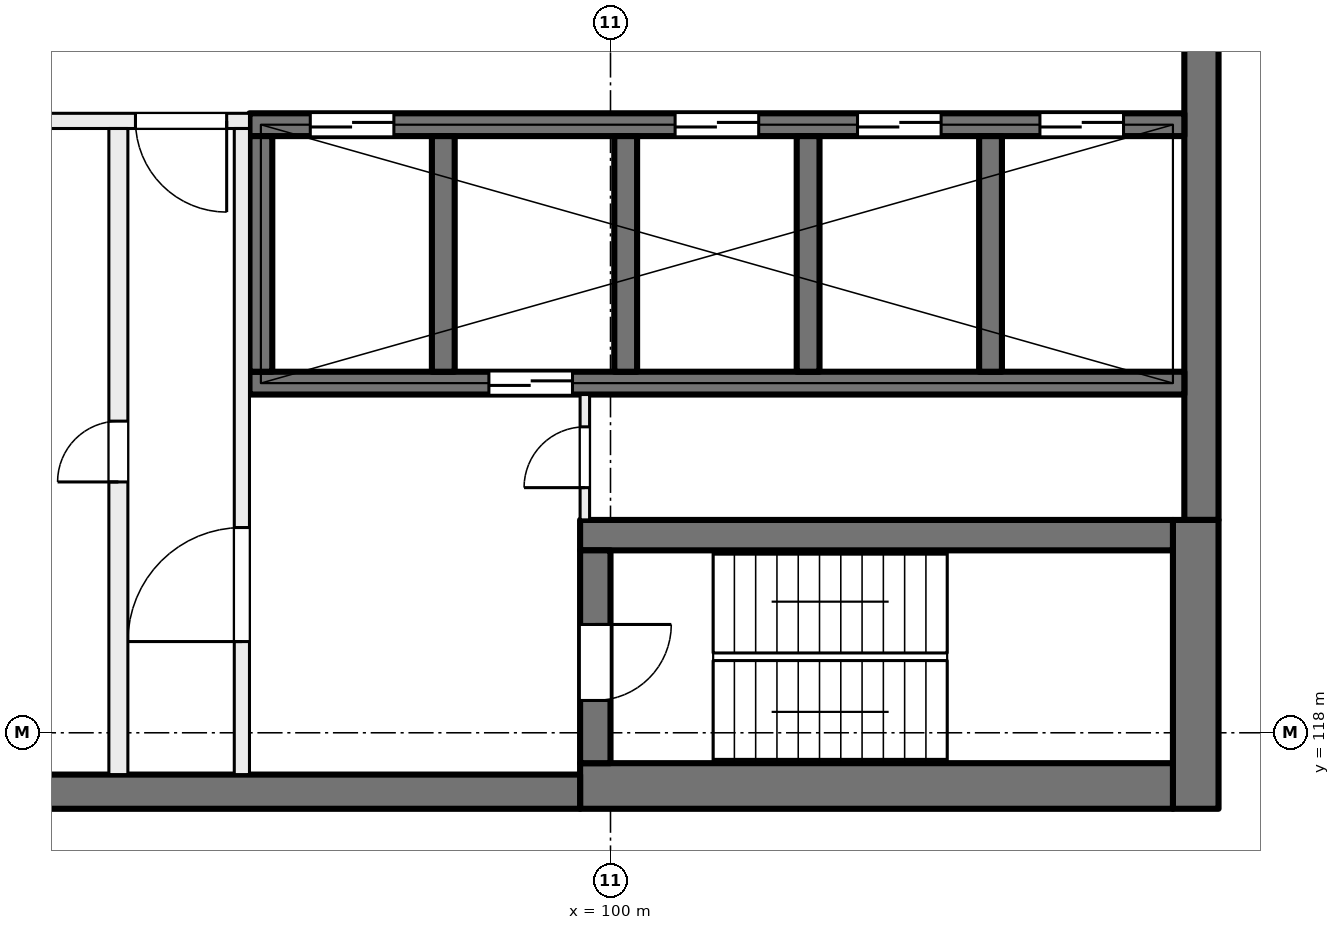
"""IFC4 building model, lengths in metres.
Left out: names, types, materials, properties, quantities, classifications, styles, units other than length and angle.
Written with IfcOpenShell. Run it as: python <this file> out.ifc"""

import sys

from ifc_helpers import new_model, si_unit, direction, frame, frame_2d, origin, place, context, subcontext, project, spatial, rectangle, extrude, element, fill, save


model = new_model("IFC4")
c1 = context("Model", 3, precision=1e-05, world=origin(), true_north=direction((0.0, 1.0)))
c2 = subcontext(c1, "Body", "Model", "MODEL_VIEW")
j1 = project(units=[si_unit("LENGTHUNIT", "METRE"), si_unit("PLANEANGLEUNIT", "RADIAN")], contexts=[c1])
p1 = place(None, origin())
s1 = spatial("IfcSite", under=j1, at=p1, CompositionType="ELEMENT")
p2 = place(p1, origin())
s2 = spatial("IfcBuilding", under=s1, at=p2, CompositionType="ELEMENT")
p3 = place(p2, frame((0.0, 0.0, 253.5)))
s3 = spatial("IfcBuildingStorey", under=s2, at=p3, CompositionType="ELEMENT", Elevation=253.5)
p4 = place(p3, frame((107.775, 135.2, 0.0), z_axis=(0.0, 0.0, 1.0), x_axis=(0.0, -1.0, 0.0)))
e1 = element("IfcWall", 1, at=p4, inside=s3, PredefinedType="SHEAR", context=c2, shape_type="SweptSolid", body=[
    extrude(rectangle(XDim=14.4, YDim=0.45, at=frame_2d((7.2, 0.0))), origin(), (0.0, 0.0, 1.0), 4.0),
])
p5 = place(p3, frame((107.7, 120.8, 0.0), z_axis=(0.0, 0.0, 1.0), x_axis=(0.0, -1.0, 0.0)))
e2 = element("IfcWall", 2, at=p5, inside=s3, PredefinedType="SHEAR", context=c2, shape_type="SweptSolid", body=[
    extrude(rectangle(XDim=3.8, YDim=0.6, at=frame_2d((1.9, 0.0))), origin(), (0.0, 0.0, 1.0), 4.0),
])
p6 = place(p3, frame((107.4, 117.3, 0.0), z_axis=(0.0, 0.0, 1.0), x_axis=(-1.0, 0.0, 0.0)))
e3 = element("IfcWall", 3, at=p6, inside=s3, PredefinedType="SHEAR", context=c2, shape_type="SweptSolid", body=[
    extrude(rectangle(XDim=7.8, YDim=0.6, at=frame_2d((3.9, 0.0))), origin(), (0.0, 0.0, 1.0), 4.0),
])
p7 = place(p3, frame((99.6, 117.225, 0.0), z_axis=(0.0, 0.0, 1.0), x_axis=(-1.0, 0.0, 0.0)))
e4 = element("IfcWall", 4, at=p7, inside=s3, PredefinedType="SHEAR", context=c2, shape_type="SweptSolid", body=[
    extrude(rectangle(XDim=9.0, YDim=0.45, at=frame_2d((4.5, 0.0))), origin(), (0.0, 0.0, 1.0), 4.0),
])
p8 = place(p3, frame((107.4, 120.6, 0.0), z_axis=(0.0, 0.0, 1.0), x_axis=(-1.0, 0.0, 0.0)))
e5 = element("IfcWall", 5, at=p8, inside=s3, PredefinedType="SHEAR", context=c2, shape_type="SweptSolid", body=[
    extrude(rectangle(XDim=7.8, YDim=0.4, at=frame_2d((3.9, 0.0))), origin(), (0.0, 0.0, 1.0), 4.0),
])
p9 = place(p3, frame((99.8, 120.4, 0.0), z_axis=(0.0, 0.0, 1.0), x_axis=(0.0, -1.0, 0.0)))
e6 = element("IfcWall", 6, at=p9, inside=s3, PredefinedType="SHEAR", context=c2, shape_type="SweptSolid", body=[
    extrude(rectangle(XDim=2.8, YDim=0.4, at=frame_2d((1.4, 0.0))), origin(), (0.0, 0.0, 1.0), 4.0),
])
p10 = place(p9, frame((0.975, 0.0, 0.0)))
e7 = element("IfcOpeningElement", 7, at=p10, cuts=e6, PredefinedType="OPENING", context=c2, shape_type="SweptSolid", body=[
    extrude(rectangle(XDim=1.0, YDim=2.1, at=frame_2d((0.5, 1.05))), frame((0.0, 0.21, 0.0), z_axis=(0.0, -1.0, 0.0), x_axis=(1.0, 0.0, 0.0)), (0.0, 0.0, 1.0), 0.42),
])
p11 = place(p3, frame((107.55, 126.0, 0.0), z_axis=(0.0, 0.0, 1.0), x_axis=(-1.0, 0.0, 0.0)))
e8 = element("IfcWall", 8, at=p11, inside=s3, PredefinedType="SHEAR", context=c2, shape_type="SweptSolid", body=[
    extrude(rectangle(XDim=12.3, YDim=0.3, at=frame_2d((6.15, 0.0))), origin(), (0.0, 0.0, 1.0), 4.0),
])
p12 = place(p11, frame((0.8, 0.0, 0.0)))
e9 = element("IfcOpeningElement", 9, at=p12, cuts=e8, PredefinedType="OPENING", context=c2, shape_type="SweptSolid", body=[
    extrude(rectangle(XDim=1.1, YDim=2.1, at=frame_2d((0.55, 1.05))), frame((0.0, 0.16, 0.0), z_axis=(0.0, -1.0, 0.0), x_axis=(1.0, 0.0, 0.0)), (0.0, 0.0, 1.0), 0.32),
])
p13 = place(p11, frame((3.2, 0.0, 0.0)))
e10 = element("IfcOpeningElement", 10, at=p13, cuts=e8, PredefinedType="OPENING", context=c2, shape_type="SweptSolid", body=[
    extrude(rectangle(XDim=1.1, YDim=2.1, at=frame_2d((0.55, 1.05))), frame((0.0, 0.16, 0.0), z_axis=(0.0, -1.0, 0.0), x_axis=(1.0, 0.0, 0.0)), (0.0, 0.0, 1.0), 0.32),
])
p14 = place(p11, frame((5.6, 0.0, 0.0)))
e11 = element("IfcOpeningElement", 11, at=p14, cuts=e8, PredefinedType="OPENING", context=c2, shape_type="SweptSolid", body=[
    extrude(rectangle(XDim=1.1, YDim=2.1, at=frame_2d((0.55, 1.05))), frame((0.0, 0.16, 0.0), z_axis=(0.0, -1.0, 0.0), x_axis=(1.0, 0.0, 0.0)), (0.0, 0.0, 1.0), 0.32),
])
p15 = place(p11, frame((10.4, 0.0, 0.0)))
e12 = element("IfcOpeningElement", 12, at=p15, cuts=e8, PredefinedType="OPENING", context=c2, shape_type="SweptSolid", body=[
    extrude(rectangle(XDim=1.1, YDim=2.1, at=frame_2d((0.55, 1.05))), frame((0.0, 0.16, 0.0), z_axis=(0.0, -1.0, 0.0), x_axis=(1.0, 0.0, 0.0)), (0.0, 0.0, 1.0), 0.32),
])
p16 = place(p3, frame((107.55, 122.6, 0.0), z_axis=(0.0, 0.0, 1.0), x_axis=(-1.0, 0.0, 0.0)))
e13 = element("IfcWall", 13, at=p16, inside=s3, PredefinedType="SHEAR", context=c2, shape_type="SweptSolid", body=[
    extrude(rectangle(XDim=12.3, YDim=0.3, at=frame_2d((6.15, 0.0))), origin(), (0.0, 0.0, 1.0), 4.0),
])
p17 = place(p16, frame((8.05, 0.0, 0.0)))
e14 = element("IfcOpeningElement", 14, at=p17, cuts=e13, PredefinedType="OPENING", context=c2, shape_type="SweptSolid", body=[
    extrude(rectangle(XDim=1.1, YDim=2.1, at=frame_2d((0.55, 1.05))), frame((0.0, 0.16, 0.0), z_axis=(0.0, -1.0, 0.0), x_axis=(1.0, 0.0, 0.0)), (0.0, 0.0, 1.0), 0.32),
])
for number, where, z_axis, x_axis in (
    (15, (105.0, 125.85, 0.0), (0.0, 0.0, 1.0), (0.0, -1.0, 0.0)),
    (16, (102.6, 125.85, 0.0), (0.0, 0.0, 1.0), (0.0, -1.0, 0.0)),
    (17, (100.2, 125.85, 0.0), (0.0, 0.0, 1.0), (0.0, -1.0, 0.0)),
    (18, (97.8, 125.85, 0.0), (0.0, 0.0, 1.0), (0.0, -1.0, 0.0)),
    (19, (95.4, 125.85, 0.0), (0.0, 0.0, 1.0), (0.0, -1.0, 0.0)),
):
    element("IfcWall", number, at=place(p3, frame(where, z_axis=z_axis, x_axis=x_axis)), inside=s3, PredefinedType="SHEAR", context=c2, shape_type="SweptSolid", body=[
        extrude(rectangle(XDim=3.1, YDim=0.3, at=frame_2d((1.55, 0.0))), origin(), (0.0, 0.0, 1.0), 4.0),
    ])
p18 = place(p3, frame((95.25, 126.05, 0.0), z_axis=(0.0, 0.0, 1.0), x_axis=(-1.0, 0.0, 0.0)))
e20 = element("IfcWall", 20, at=p18, inside=s3, PredefinedType="PARTITIONING", context=c2, shape_type="SweptSolid", body=[
    extrude(rectangle(XDim=3.95, YDim=0.2, at=frame_2d((1.975, 0.0))), origin(), (0.0, 0.0, 1.0), 3.625),
])
p19 = place(p18, frame((0.3, 0.0, 0.0)))
e21 = element("IfcOpeningElement", 21, at=p19, cuts=e20, PredefinedType="OPENING", context=c2, shape_type="SweptSolid", body=[
    extrude(rectangle(XDim=1.2, YDim=2.1, at=frame_2d((0.6, 1.05))), frame((0.0, 0.11, 0.0), z_axis=(0.0, -1.0, 0.0), x_axis=(1.0, 0.0, 0.0)), (0.0, 0.0, 1.0), 0.22),
])
p20 = place(p3, frame((95.15, 117.45, 0.0), z_axis=(0.0, 0.0, 1.0), x_axis=(0.0, 1.0, 0.0)))
e22 = element("IfcWall", 22, at=p20, inside=s3, PredefinedType="PARTITIONING", context=c2, shape_type="SweptSolid", body=[
    extrude(rectangle(XDim=8.5, YDim=0.2, at=frame_2d((4.25, 0.0))), origin(), (0.0, 0.0, 1.0), 3.625),
])
p21 = place(p20, frame((1.75, 0.0, 0.0)))
e23 = element("IfcOpeningElement", 23, at=p21, cuts=e22, PredefinedType="OPENING", context=c2, shape_type="SweptSolid", body=[
    extrude(rectangle(XDim=1.5, YDim=2.1, at=frame_2d((0.75, 1.05))), frame((0.0, 0.11, 0.0), z_axis=(0.0, -1.0, 0.0), x_axis=(1.0, 0.0, 0.0)), (0.0, 0.0, 1.0), 0.22),
])
p22 = place(p3, frame((93.525, 117.45, 0.0), z_axis=(0.0, 0.0, 1.0), x_axis=(0.0, 1.0, 0.0)))
e24 = element("IfcWall", 24, at=p22, inside=s3, PredefinedType="PARTITIONING", context=c2, shape_type="SweptSolid", body=[
    extrude(rectangle(XDim=8.5, YDim=0.25, at=frame_2d((4.25, 0.0))), origin(), (0.0, 0.0, 1.0), 3.625),
])
p23 = place(p22, frame((3.85, 0.0, 0.0)))
e25 = element("IfcOpeningElement", 25, at=p23, cuts=e24, PredefinedType="OPENING", context=c2, shape_type="SweptSolid", body=[
    extrude(rectangle(XDim=0.8, YDim=2.1, at=frame_2d((0.4, 1.05))), frame((0.0, 0.135, 0.0), z_axis=(0.0, -1.0, 0.0), x_axis=(1.0, 0.0, 0.0)), (0.0, 0.0, 1.0), 0.27),
])
p24 = place(p3, frame((99.663, 120.8, 0.0), z_axis=(0.0, 0.0, 1.0), x_axis=(0.0, 1.0, 0.0)))
e26 = element("IfcWall", 26, at=p24, inside=s3, PredefinedType="PARTITIONING", context=c2, shape_type="SweptSolid", body=[
    extrude(rectangle(XDim=1.65, YDim=0.125, at=frame_2d((0.825, 0.0))), origin(), (0.0, 0.0, 1.0), 3.625),
])
p25 = place(p24, frame((0.425, 0.0, 0.0)))
e27 = element("IfcOpeningElement", 27, at=p25, cuts=e26, PredefinedType="OPENING", context=c2, shape_type="SweptSolid", body=[
    extrude(rectangle(XDim=0.8, YDim=2.1, at=frame_2d((0.4, 1.05))), frame((0.0, 0.073, 0.0), z_axis=(0.0, -1.0, 0.0), x_axis=(1.0, 0.0, 0.0)), (0.0, 0.0, 1.0), 0.145),
])
p26 = place(p12, origin())
e28 = element("IfcDoor", 28, at=p26, inside=s3, OperationType="DOUBLE_DOOR_SLIDING", PredefinedType="DOOR", context=c2, shape_type="SweptSolid", body=[
    extrude(rectangle(XDim=1.1, YDim=2.1, at=frame_2d((0.55, 1.05))), frame((0.0, 0.025, 0.0), z_axis=(0.0, -1.0, 0.0), x_axis=(1.0, 0.0, 0.0)), (0.0, 0.0, 1.0), 0.05),
])
fill(e9, e28)
p27 = place(p13, origin())
e29 = element("IfcDoor", 29, at=p27, inside=s3, OperationType="DOUBLE_DOOR_SLIDING", PredefinedType="DOOR", context=c2, shape_type="SweptSolid", body=[
    extrude(rectangle(XDim=1.1, YDim=2.1, at=frame_2d((0.55, 1.05))), frame((0.0, 0.025, 0.0), z_axis=(0.0, -1.0, 0.0), x_axis=(1.0, 0.0, 0.0)), (0.0, 0.0, 1.0), 0.05),
])
fill(e10, e29)
p28 = place(p14, origin())
e30 = element("IfcDoor", 30, at=p28, inside=s3, OperationType="DOUBLE_DOOR_SLIDING", PredefinedType="DOOR", context=c2, shape_type="SweptSolid", body=[
    extrude(rectangle(XDim=1.1, YDim=2.1, at=frame_2d((0.55, 1.05))), frame((0.0, 0.025, 0.0), z_axis=(0.0, -1.0, 0.0), x_axis=(1.0, 0.0, 0.0)), (0.0, 0.0, 1.0), 0.05),
])
fill(e11, e30)
p29 = place(p15, origin())
e31 = element("IfcDoor", 31, at=p29, inside=s3, OperationType="DOUBLE_DOOR_SLIDING", PredefinedType="DOOR", context=c2, shape_type="SweptSolid", body=[
    extrude(rectangle(XDim=1.1, YDim=2.1, at=frame_2d((0.55, 1.05))), frame((0.0, 0.025, 0.0), z_axis=(0.0, -1.0, 0.0), x_axis=(1.0, 0.0, 0.0)), (0.0, 0.0, 1.0), 0.05),
])
fill(e12, e31)
p30 = place(p19, origin())
e32 = element("IfcDoor", 32, at=p30, inside=s3, OperationType="DOUBLE_DOOR_SINGLE_SWING", PredefinedType="DOOR", context=c2, shape_type="SweptSolid", body=[
    extrude(rectangle(XDim=1.2, YDim=2.1, at=frame_2d((0.6, 1.05))), frame((0.0, 0.025, 0.0), z_axis=(0.0, -1.0, 0.0), x_axis=(1.0, 0.0, 0.0)), (0.0, 0.0, 1.0), 0.05),
])
fill(e21, e32)
p31 = place(p21, origin())
e33 = element("IfcDoor", 33, at=p31, inside=s3, OperationType="DOUBLE_DOOR_SINGLE_SWING", PredefinedType="DOOR", context=c2, shape_type="SweptSolid", body=[
    extrude(rectangle(XDim=1.5, YDim=2.1, at=frame_2d((0.75, 1.05))), frame((0.0, 0.025, 0.0), z_axis=(0.0, -1.0, 0.0), x_axis=(1.0, 0.0, 0.0)), (0.0, 0.0, 1.0), 0.05),
])
fill(e23, e33)
p32 = place(p10, origin())
e34 = element("IfcDoor", 34, at=p32, inside=s3, OperationType="SINGLE_SWING_LEFT", PredefinedType="DOOR", context=c2, shape_type="SweptSolid", body=[
    extrude(rectangle(XDim=1.0, YDim=2.1, at=frame_2d((0.5, 1.05))), frame((0.0, 0.025, 0.0), z_axis=(0.0, -1.0, 0.0), x_axis=(1.0, 0.0, 0.0)), (0.0, 0.0, 1.0), 0.05),
])
fill(e7, e34)
p33 = place(p25, origin())
e35 = element("IfcDoor", 35, at=p33, inside=s3, OperationType="SINGLE_SWING_RIGHT", PredefinedType="DOOR", context=c2, shape_type="SweptSolid", body=[
    extrude(rectangle(XDim=0.8, YDim=2.1, at=frame_2d((0.4, 1.05))), frame((0.0, 0.025, 0.0), z_axis=(0.0, -1.0, 0.0), x_axis=(1.0, 0.0, 0.0)), (0.0, 0.0, 1.0), 0.05),
])
fill(e27, e35)
p34 = place(p23, origin())
e36 = element("IfcDoor", 36, at=p34, inside=s3, OperationType="SINGLE_SWING_LEFT", PredefinedType="DOOR", context=c2, shape_type="SweptSolid", body=[
    extrude(rectangle(XDim=0.8, YDim=2.1, at=frame_2d((0.4, 1.05))), frame((0.0, 0.025, 0.0), z_axis=(0.0, -1.0, 0.0), x_axis=(1.0, 0.0, 0.0)), (0.0, 0.0, 1.0), 0.05),
])
fill(e25, e36)
p35 = place(p17, origin())
e37 = element("IfcDoor", 37, at=p35, inside=s3, OperationType="DOUBLE_DOOR_SLIDING", PredefinedType="DOOR", context=c2, shape_type="SweptSolid", body=[
    extrude(rectangle(XDim=1.1, YDim=2.1, at=frame_2d((0.55, 1.05))), frame((0.0, 0.025, 0.0), z_axis=(0.0, -1.0, 0.0), x_axis=(1.0, 0.0, 0.0)), (0.0, 0.0, 1.0), 0.05),
])
fill(e14, e37)
save(model, sys.argv[1])
